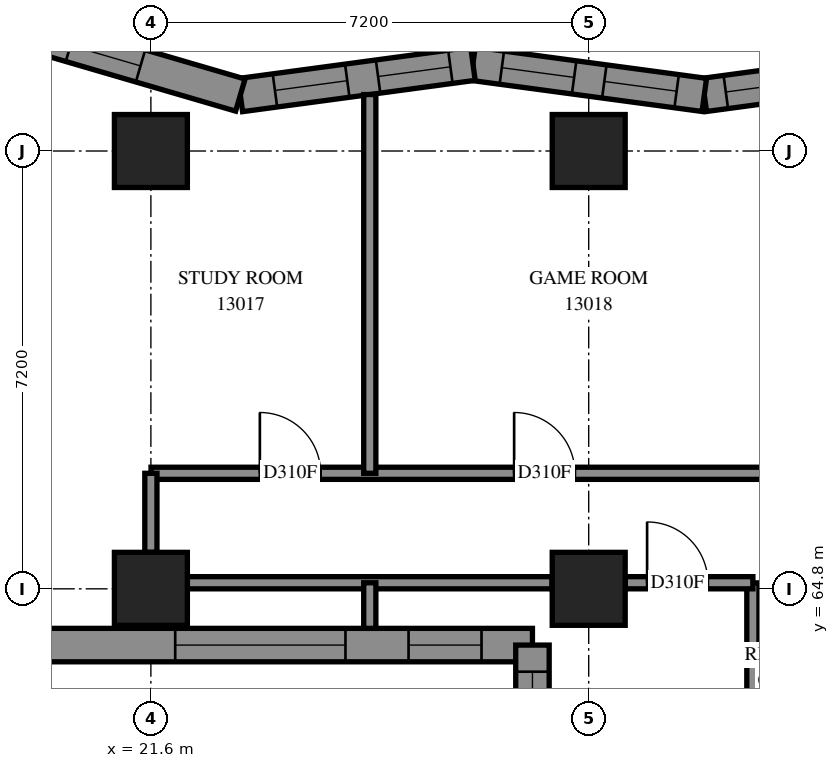
"""IFC4 building model, lengths in metres.
Left out: names, types, materials, properties, quantities, classifications, styles, units other than length and angle.
Written with IfcOpenShell. Run it as: python <this file> out.ifc"""

import sys

from ifc_helpers import new_model, si_unit, direction, frame, frame_2d, origin, origin_2d, place, context, subcontext, project, spatial, polyline, rectangle, outline, extrude, element, fill, save


model = new_model("IFC4")
c1 = context("Model", 3, precision=1e-05, world=origin(), true_north=direction((0.0, 1.0)))
c2 = subcontext(c1, "Body", "Model", "MODEL_VIEW")
j1 = project(units=[si_unit("LENGTHUNIT", "METRE"), si_unit("PLANEANGLEUNIT", "RADIAN")], contexts=[c1])
p1 = place(None, origin())
s1 = spatial("IfcSite", under=j1, at=p1, CompositionType="ELEMENT")
p2 = place(p1, origin())
s2 = spatial("IfcBuilding", under=s1, at=p2, CompositionType="ELEMENT")
p3 = place(p2, frame((0.0, 0.0, 50.8)))
s3 = spatial("IfcBuildingStorey", under=s2, at=p3, CompositionType="ELEMENT", Elevation=50.8)
for number, where, z_axis, x_axis in (
    (1, (21.6, 64.8, 0.0), (0.0, 0.0, 1.0), (1.0, 0.0, 0.0)),
    (2, (21.6, 72.0, 0.0), (0.0, 0.0, 1.0), (1.0, 0.0, 0.0)),
    (3, (28.8, 64.8, 0.0), (0.0, 0.0, 1.0), (1.0, 0.0, 0.0)),
    (4, (28.8, 72.0, 0.0), (0.0, 0.0, 1.0), (1.0, 0.0, 0.0)),
):
    element("IfcColumn", number, at=place(p3, frame(where, z_axis=z_axis, x_axis=x_axis)), inside=s3, PredefinedType="COLUMN", context=c2, shape_type="SweptSolid", body=[
        extrude(rectangle(XDim=1.2, YDim=1.2, at=origin_2d()), origin(), (0.0, 0.0, 1.0), 3.1),
    ])
p4 = place(p3, frame((34.505, 73.434, 0.0), z_axis=(0.0, 0.0, 1.0), x_axis=(-0.9910647018, -0.133381996, 0.0)))
e5 = element("IfcWall", 5, at=p4, inside=s3, PredefinedType="SOLIDWALL", context=c2, shape_type="SweptSolid", body=[
    extrude(outline(polyline([(-0.037, -0.275), (3.802, -0.275), (3.876, 0.275), (0.037, 0.275), (-0.037, -0.275)])), origin(), (0.0, 0.0, 1.0), 3.1),
])
p5 = place(p4, frame((0.581, 0.0, 0.5)))
e6 = element("IfcOpeningElement", 6, at=p5, cuts=e5, PredefinedType="OPENING", context=c2, shape_type="SweptSolid", body=[
    extrude(rectangle(XDim=1.2, YDim=2.45, at=frame_2d((0.6, 1.225))), frame((0.0, 0.285, 0.0), z_axis=(0.0, -1.0, 0.0), x_axis=(1.0, 0.0, 0.0)), (0.0, 0.0, 1.0), 0.57),
])
p6 = place(p4, frame((2.281, 0.0, 0.5)))
e7 = element("IfcOpeningElement", 7, at=p6, cuts=e5, PredefinedType="OPENING", context=c2, shape_type="SweptSolid", body=[
    extrude(rectangle(XDim=1.2, YDim=2.45, at=frame_2d((0.6, 1.225))), frame((0.0, 0.285, 0.0), z_axis=(0.0, -1.0, 0.0), x_axis=(1.0, 0.0, 0.0)), (0.0, 0.0, 1.0), 0.57),
])
p7 = place(p3, frame((30.701, 72.922, 0.0), z_axis=(0.0, 0.0, 1.0), x_axis=(-0.9910651652, 0.1333785524, 0.0)))
e8 = element("IfcWall", 8, at=p7, inside=s3, PredefinedType="SOLIDWALL", context=c2, shape_type="SweptSolid", body=[
    extrude(outline(polyline([(0.037, -0.275), (3.876, -0.275), (3.802, 0.275), (-0.037, 0.275), (0.037, -0.275)])), origin(), (0.0, 0.0, 1.0), 3.1),
])
p8 = place(p7, frame((0.459, 0.0, 0.5)))
e9 = element("IfcOpeningElement", 9, at=p8, cuts=e8, PredefinedType="OPENING", context=c2, shape_type="SweptSolid", body=[
    extrude(rectangle(XDim=1.2, YDim=2.45, at=frame_2d((0.6, 1.225))), frame((0.0, 0.285, 0.0), z_axis=(0.0, -1.0, 0.0), x_axis=(1.0, 0.0, 0.0)), (0.0, 0.0, 1.0), 0.57),
])
p9 = place(p7, frame((2.16, 0.0, 0.5)))
e10 = element("IfcOpeningElement", 10, at=p9, cuts=e8, PredefinedType="OPENING", context=c2, shape_type="SweptSolid", body=[
    extrude(rectangle(XDim=1.2, YDim=2.45, at=frame_2d((0.6, 1.225))), frame((0.0, 0.285, 0.0), z_axis=(0.0, -1.0, 0.0), x_axis=(1.0, 0.0, 0.0)), (0.0, 0.0, 1.0), 0.57),
])
p10 = place(p3, frame((26.897, 73.434, 0.0), z_axis=(0.0, 0.0, 1.0), x_axis=(-0.9910665233, -0.1333684607, 0.0)))
e11 = element("IfcWall", 11, at=p10, inside=s3, PredefinedType="SOLIDWALL", context=c2, shape_type="SweptSolid", body=[
    extrude(outline(polyline([(-0.037, -0.275), (3.802, -0.275), (3.918, 0.275), (0.037, 0.275), (-0.037, -0.275)])), origin(), (0.0, 0.0, 1.0), 3.1),
])
p11 = place(p10, frame((0.374, 0.0, 0.5)))
e12 = element("IfcOpeningElement", 12, at=p11, cuts=e11, PredefinedType="OPENING", context=c2, shape_type="SweptSolid", body=[
    extrude(rectangle(XDim=1.2, YDim=2.45, at=frame_2d((0.6, 1.225))), frame((0.0, 0.285, 0.0), z_axis=(0.0, -1.0, 0.0), x_axis=(1.0, 0.0, 0.0)), (0.0, 0.0, 1.0), 0.57),
])
p12 = place(p10, frame((2.086, 0.0, 0.5)))
e13 = element("IfcOpeningElement", 13, at=p12, cuts=e11, PredefinedType="OPENING", context=c2, shape_type="SweptSolid", body=[
    extrude(rectangle(XDim=1.2, YDim=2.45, at=frame_2d((0.6, 1.225))), frame((0.0, 0.285, 0.0), z_axis=(0.0, -1.0, 0.0), x_axis=(1.0, 0.0, 0.0)), (0.0, 0.0, 1.0), 0.57),
])
p13 = place(p3, frame((23.071, 72.92, 0.0), z_axis=(0.0, 0.0, 1.0), x_axis=(-0.9598398865, 0.280548378, 0.0)))
e14 = element("IfcWall", 14, at=p13, inside=s3, PredefinedType="SOLIDWALL", context=c2, shape_type="SweptSolid", body=[
    extrude(outline(polyline([(0.058, -0.275), (4.022, -0.275), (3.288, 0.275), (-0.058, 0.275), (0.058, -0.275)])), origin(), (0.0, 0.0, 1.0), 3.1),
])
p14 = place(p13, frame((1.71, 0.0, 0.5)))
e15 = element("IfcOpeningElement", 15, at=p14, cuts=e14, PredefinedType="OPENING", context=c2, shape_type="SweptSolid", body=[
    extrude(rectangle(XDim=1.2, YDim=2.45, at=frame_2d((0.6, 1.225))), frame((0.0, 0.285, 0.0), z_axis=(0.0, -1.0, 0.0), x_axis=(1.0, 0.0, 0.0)), (0.0, 0.0, 1.0), 0.57),
])
p15 = place(p3, frame((19.563, 63.875, 0.0), z_axis=(0.0, 0.0, 1.0), x_axis=(1.0, 0.0, 0.0)))
e16 = element("IfcWall", 16, at=p15, inside=s3, PredefinedType="SOLIDWALL", context=c2, shape_type="SweptSolid", body=[
    extrude(outline(polyline([(-0.275, -0.275), (8.037, -0.275), (8.587, 0.275), (0.275, 0.275), (-0.275, -0.275)])), origin(), (0.0, 0.0, 1.0), 3.1),
])
p16 = place(p15, frame((2.437, 0.0, 0.5)))
e17 = element("IfcOpeningElement", 17, at=p16, cuts=e16, PredefinedType="OPENING", context=c2, shape_type="SweptSolid", body=[
    extrude(rectangle(XDim=2.8, YDim=2.45, at=frame_2d((1.4, 1.225))), frame((0.0, 0.285, 0.0), z_axis=(0.0, -1.0, 0.0), x_axis=(1.0, 0.0, 0.0)), (0.0, 0.0, 1.0), 0.57),
])
p17 = place(p15, frame((6.274, 0.0, 0.5)))
e18 = element("IfcOpeningElement", 18, at=p17, cuts=e16, PredefinedType="OPENING", context=c2, shape_type="SweptSolid", body=[
    extrude(rectangle(XDim=1.2, YDim=2.45, at=frame_2d((0.6, 1.225))), frame((0.0, 0.285, 0.0), z_axis=(0.0, -1.0, 0.0), x_axis=(1.0, 0.0, 0.0)), (0.0, 0.0, 1.0), 0.57),
])
p18 = place(p3, frame((27.875, 63.875, 0.0), z_axis=(0.0, 0.0, 1.0), x_axis=(0.0, -1.0, 0.0)))
e19 = element("IfcWall", 19, at=p18, inside=s3, PredefinedType="SOLIDWALL", context=c2, shape_type="SweptSolid", body=[
    extrude(outline(polyline([(0.275, -0.275), (8.587, -0.275), (8.037, 0.275), (-0.275, 0.275), (0.275, -0.275)])), origin(), (0.0, 0.0, 1.0), 3.1),
])
p19 = place(p18, frame((0.438, 0.0, 0.5)))
e20 = element("IfcOpeningElement", 20, at=p19, cuts=e19, PredefinedType="OPENING", context=c2, shape_type="SweptSolid", body=[
    extrude(rectangle(XDim=1.2, YDim=2.45, at=frame_2d((0.6, 1.225))), frame((0.0, 0.285, 0.0), z_axis=(0.0, -1.0, 0.0), x_axis=(1.0, 0.0, 0.0)), (0.0, 0.0, 1.0), 0.57),
])
p20 = place(p18, frame((3.875, 0.0, 0.7)))
e21 = element("IfcOpeningElement", 21, at=p20, cuts=e19, PredefinedType="OPENING", context=c2, shape_type="SweptSolid", body=[
    extrude(rectangle(XDim=1.8, YDim=2.2, at=frame_2d((0.9, 1.1))), frame((0.0, 0.285, 0.0), z_axis=(0.0, -1.0, 0.0), x_axis=(1.0, 0.0, 0.0)), (0.0, 0.0, 1.0), 0.57),
])
p21 = place(p3, frame((21.602, 66.7, 0.0), z_axis=(0.0, 0.0, 1.0), x_axis=(1.0, 0.0, 0.0)))
e22 = element("IfcWall", 22, at=p21, inside=s3, PredefinedType="PARTITIONING", context=c2, shape_type="SweptSolid", body=[
    extrude(rectangle(XDim=11.698, YDim=0.2, at=frame_2d((5.849, 0.0))), origin(), (0.0, 0.0, 1.0), 3.1),
])
p22 = place(p21, frame((1.79, 0.0, 0.0)))
e23 = element("IfcOpeningElement", 23, at=p22, cuts=e22, PredefinedType="OPENING", context=c2, shape_type="SweptSolid", body=[
    extrude(rectangle(XDim=1.0, YDim=2.1, at=frame_2d((0.5, 1.05))), frame((0.0, 0.11, 0.0), z_axis=(0.0, -1.0, 0.0), x_axis=(1.0, 0.0, 0.0)), (0.0, 0.0, 1.0), 0.22),
])
p23 = place(p21, frame((5.972, 0.0, 0.0)))
e24 = element("IfcOpeningElement", 24, at=p23, cuts=e22, PredefinedType="OPENING", context=c2, shape_type="SweptSolid", body=[
    extrude(rectangle(XDim=1.0, YDim=2.1, at=frame_2d((0.5, 1.05))), frame((0.0, 0.11, 0.0), z_axis=(0.0, -1.0, 0.0), x_axis=(1.0, 0.0, 0.0)), (0.0, 0.0, 1.0), 0.22),
])
p24 = place(p3, frame((25.2, 66.7, 0.0), z_axis=(0.0, 0.0, 1.0), x_axis=(0.0, 1.0, 0.0)))
e25 = element("IfcWall", 25, at=p24, inside=s3, PredefinedType="PARTITIONING", context=c2, shape_type="SweptSolid", body=[
    extrude(rectangle(XDim=6.229, YDim=0.2, at=frame_2d((3.114, 0.0))), origin(), (0.0, 0.0, 1.0), 3.1),
])
p25 = place(p3, frame((22.2, 64.9, 0.0), z_axis=(0.0, 0.0, 1.0), x_axis=(1.0, 0.0, 0.0)))
e26 = element("IfcWall", 26, at=p25, inside=s3, PredefinedType="PARTITIONING", context=c2, shape_type="SweptSolid", body=[
    extrude(rectangle(XDim=6.0, YDim=0.2, at=frame_2d((3.0, 0.0))), origin(), (0.0, 0.0, 1.0), 2.6),
])
p26 = place(p3, frame((31.5, 62.102, 0.0), z_axis=(0.0, 0.0, 1.0), x_axis=(0.0, 1.0, 0.0)))
e27 = element("IfcWall", 27, at=p26, inside=s3, PredefinedType="PARTITIONING", context=c2, shape_type="SweptSolid", body=[
    extrude(rectangle(XDim=2.796, YDim=0.2, at=frame_2d((1.398, 0.0))), origin(), (0.0, 0.0, 1.0), 3.1),
])
p27 = place(p3, frame((29.4, 64.9, 0.0), z_axis=(0.0, 0.0, 1.0), x_axis=(1.0, 0.0, 0.0)))
e28 = element("IfcWall", 28, at=p27, inside=s3, PredefinedType="PARTITIONING", context=c2, shape_type="SweptSolid", body=[
    extrude(rectangle(XDim=2.1, YDim=0.2, at=frame_2d((1.05, 0.0))), origin(), (0.0, 0.0, 1.0), 3.1),
])
p28 = place(p27, frame((0.36, 0.0, 0.0)))
e29 = element("IfcOpeningElement", 29, at=p28, cuts=e28, PredefinedType="OPENING", context=c2, shape_type="SweptSolid", body=[
    extrude(rectangle(XDim=1.0, YDim=2.1, at=frame_2d((0.5, 1.05))), frame((0.0, 0.11, 0.0), z_axis=(0.0, -1.0, 0.0), x_axis=(1.0, 0.0, 0.0)), (0.0, 0.0, 1.0), 0.22),
])
p29 = place(p3, frame((21.6, 65.4, 0.0), z_axis=(0.0, 0.0, 1.0), x_axis=(0.0, 1.0, 0.0)))
e30 = element("IfcWall", 30, at=p29, inside=s3, PredefinedType="PARTITIONING", context=c2, shape_type="SweptSolid", body=[
    extrude(rectangle(XDim=1.3, YDim=0.2, at=frame_2d((0.65, 0.0))), origin(), (0.0, 0.0, 1.0), 2.6),
])
p30 = place(p3, frame((25.2, 64.15, 0.0), z_axis=(0.0, 0.0, 1.0), x_axis=(0.0, 1.0, 0.0)))
e31 = element("IfcWall", 31, at=p30, inside=s3, PredefinedType="PARTITIONING", context=c2, shape_type="SweptSolid", body=[
    extrude(rectangle(XDim=0.75, YDim=0.2, at=frame_2d((0.375, 0.0))), origin(), (0.0, 0.0, 1.0), 3.1),
])
p31 = place(p3, frame((28.2, 64.9, 0.0), z_axis=(0.0, 0.0, 1.0), x_axis=(1.0, 0.0, 0.0)))
e32 = element("IfcWall", 32, at=p31, inside=s3, PredefinedType="PARTITIONING", context=c2, shape_type="SweptSolid", body=[
    extrude(rectangle(XDim=1.2, YDim=0.2, at=frame_2d((0.6, 0.0))), origin(), (0.0, 0.0, 1.0), 3.1),
])
p32 = place(p6, origin())
e33 = element("IfcWindow", 33, at=p32, inside=s3, PartitioningType="SINGLE_PANEL", PredefinedType="WINDOW", context=c2, shape_type="SweptSolid", body=[
    extrude(rectangle(XDim=1.2, YDim=2.45, at=frame_2d((0.6, 1.225))), frame((0.0, 0.155, 0.0), z_axis=(0.0, -1.0, 0.0), x_axis=(1.0, 0.0, 0.0)), (0.0, 0.0, 1.0), 0.06),
])
fill(e7, e33)
p33 = place(p8, origin())
e34 = element("IfcWindow", 34, at=p33, inside=s3, PartitioningType="SINGLE_PANEL", PredefinedType="WINDOW", context=c2, shape_type="SweptSolid", body=[
    extrude(rectangle(XDim=1.2, YDim=2.45, at=frame_2d((0.6, 1.225))), frame((0.0, 0.155, 0.0), z_axis=(0.0, -1.0, 0.0), x_axis=(1.0, 0.0, 0.0)), (0.0, 0.0, 1.0), 0.06),
])
fill(e9, e34)
p34 = place(p9, origin())
e35 = element("IfcWindow", 35, at=p34, inside=s3, PartitioningType="SINGLE_PANEL", PredefinedType="WINDOW", context=c2, shape_type="SweptSolid", body=[
    extrude(rectangle(XDim=1.2, YDim=2.45, at=frame_2d((0.6, 1.225))), frame((0.0, 0.155, 0.0), z_axis=(0.0, -1.0, 0.0), x_axis=(1.0, 0.0, 0.0)), (0.0, 0.0, 1.0), 0.06),
])
fill(e10, e35)
p35 = place(p11, origin())
e36 = element("IfcWindow", 36, at=p35, inside=s3, PartitioningType="SINGLE_PANEL", PredefinedType="WINDOW", context=c2, shape_type="SweptSolid", body=[
    extrude(rectangle(XDim=1.2, YDim=2.45, at=frame_2d((0.6, 1.225))), frame((0.0, 0.155, 0.0), z_axis=(0.0, -1.0, 0.0), x_axis=(1.0, 0.0, 0.0)), (0.0, 0.0, 1.0), 0.06),
])
fill(e12, e36)
p36 = place(p12, origin())
e37 = element("IfcWindow", 37, at=p36, inside=s3, PartitioningType="SINGLE_PANEL", PredefinedType="WINDOW", context=c2, shape_type="SweptSolid", body=[
    extrude(rectangle(XDim=1.2, YDim=2.45, at=frame_2d((0.6, 1.225))), frame((0.0, 0.155, 0.0), z_axis=(0.0, -1.0, 0.0), x_axis=(1.0, 0.0, 0.0)), (0.0, 0.0, 1.0), 0.06),
])
fill(e13, e37)
p37 = place(p14, origin())
e38 = element("IfcWindow", 38, at=p37, inside=s3, PartitioningType="SINGLE_PANEL", PredefinedType="WINDOW", context=c2, shape_type="SweptSolid", body=[
    extrude(rectangle(XDim=1.2, YDim=2.45, at=frame_2d((0.6, 1.225))), frame((0.0, 0.155, 0.0), z_axis=(0.0, -1.0, 0.0), x_axis=(1.0, 0.0, 0.0)), (0.0, 0.0, 1.0), 0.06),
])
fill(e15, e38)
p38 = place(p16, origin())
e39 = element("IfcWindow", 39, at=p38, inside=s3, PartitioningType="SINGLE_PANEL", PredefinedType="WINDOW", context=c2, shape_type="SweptSolid", body=[
    extrude(rectangle(XDim=2.8, YDim=2.45, at=frame_2d((1.4, 1.225))), frame((0.0, 0.155, 0.0), z_axis=(0.0, -1.0, 0.0), x_axis=(1.0, 0.0, 0.0)), (0.0, 0.0, 1.0), 0.06),
])
fill(e17, e39)
p39 = place(p17, origin())
e40 = element("IfcWindow", 40, at=p39, inside=s3, PartitioningType="SINGLE_PANEL", PredefinedType="WINDOW", context=c2, shape_type="SweptSolid", body=[
    extrude(rectangle(XDim=1.2, YDim=2.45, at=frame_2d((0.6, 1.225))), frame((0.0, 0.155, 0.0), z_axis=(0.0, -1.0, 0.0), x_axis=(1.0, 0.0, 0.0)), (0.0, 0.0, 1.0), 0.06),
])
fill(e18, e40)
p40 = place(p19, origin())
e41 = element("IfcWindow", 41, at=p40, inside=s3, PartitioningType="SINGLE_PANEL", PredefinedType="WINDOW", context=c2, shape_type="SweptSolid", body=[
    extrude(rectangle(XDim=1.2, YDim=2.45, at=frame_2d((0.6, 1.225))), frame((0.0, 0.155, 0.0), z_axis=(0.0, -1.0, 0.0), x_axis=(1.0, 0.0, 0.0)), (0.0, 0.0, 1.0), 0.06),
])
fill(e20, e41)
p41 = place(p22, origin())
e42 = element("IfcDoor", 42, at=p41, inside=s3, OperationType="SINGLE_SWING_RIGHT", PredefinedType="DOOR", context=c2, shape_type="SweptSolid", body=[
    extrude(rectangle(XDim=1.0, YDim=2.1, at=frame_2d((0.5, 1.05))), frame((0.0, 0.025, 0.0), z_axis=(0.0, -1.0, 0.0), x_axis=(1.0, 0.0, 0.0)), (0.0, 0.0, 1.0), 0.05),
])
fill(e23, e42)
p42 = place(p23, origin())
e43 = element("IfcDoor", 43, at=p42, inside=s3, OperationType="SINGLE_SWING_LEFT", PredefinedType="DOOR", context=c2, shape_type="SweptSolid", body=[
    extrude(rectangle(XDim=1.0, YDim=2.1, at=frame_2d((0.5, 1.05))), frame((0.0, 0.025, 0.0), z_axis=(0.0, -1.0, 0.0), x_axis=(1.0, 0.0, 0.0)), (0.0, 0.0, 1.0), 0.05),
])
fill(e24, e43)
p43 = place(p28, origin())
e44 = element("IfcDoor", 44, at=p43, inside=s3, OperationType="SINGLE_SWING_RIGHT", PredefinedType="DOOR", context=c2, shape_type="SweptSolid", body=[
    extrude(rectangle(XDim=1.0, YDim=2.1, at=frame_2d((0.5, 1.05))), frame((0.0, 0.025, 0.0), z_axis=(0.0, -1.0, 0.0), x_axis=(1.0, 0.0, 0.0)), (0.0, 0.0, 1.0), 0.05),
])
fill(e29, e44)
save(model, sys.argv[1])
